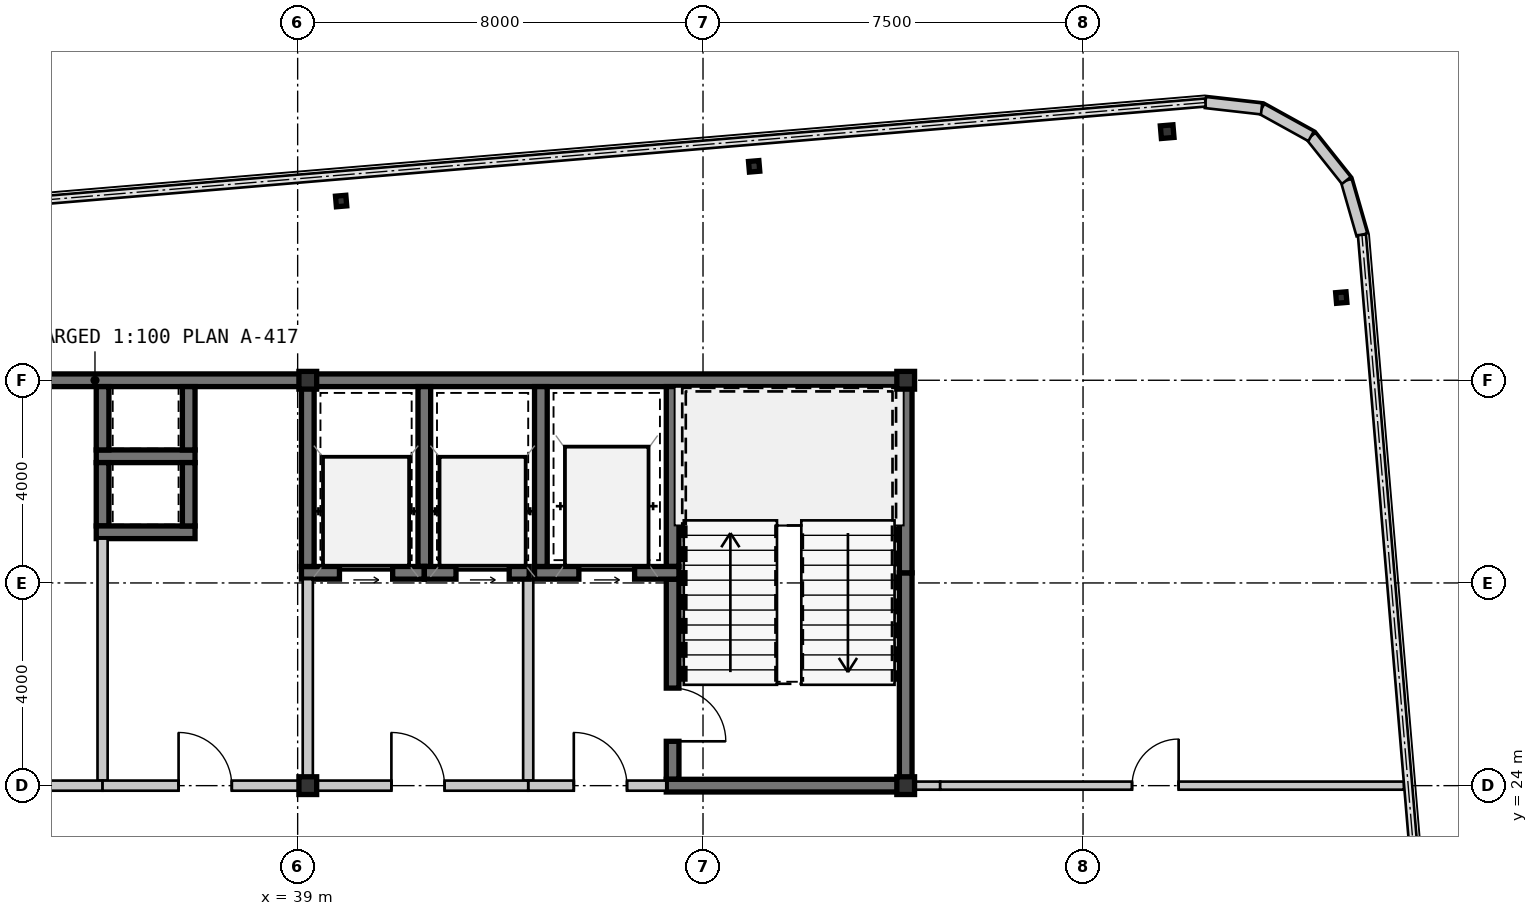
"""IFC4 building model, lengths in metres.
Left out: names, types, materials, properties, quantities, classifications, styles, units other than length and angle.
Written with IfcOpenShell. Run it as: python <this file> out.ifc"""

import sys

from ifc_helpers import new_model, si_unit, direction, frame, frame_2d, origin, origin_2d, place, context, subcontext, project, spatial, rectangle, hollow_rectangle, i_section, extrude, source, transform, mapped, element, fill, save


model = new_model("IFC4")
c1 = context("Model", 3, precision=1e-05, world=origin(), true_north=direction((0.0, 1.0)))
c2 = subcontext(c1, "Body", "Model", "MODEL_VIEW")
j1 = project(units=[si_unit("LENGTHUNIT", "METRE"), si_unit("PLANEANGLEUNIT", "RADIAN")], contexts=[c1])
p1 = place(None, origin())
s1 = spatial("IfcSite", under=j1, at=p1, CompositionType="ELEMENT")
p2 = place(p1, origin())
s2 = spatial("IfcBuilding", under=s1, at=p2, CompositionType="ELEMENT")
p3 = place(p2, frame((0.0, 0.0, 185.15)))
s3 = spatial("IfcBuildingStorey", under=s2, at=p3, CompositionType="ELEMENT", Elevation=185.15)
m1 = source(origin(), c2, "Body", "SweptSolid", [
    extrude(hollow_rectangle(XDim=0.35, YDim=0.35, WallThickness=0.016, at=origin_2d()), origin(), (0.0, 0.0, 1.0), 3.15),
])
for number, where, z_axis, x_axis in (
    (1, (39.2, 24.0, 0.0), (0.0, 0.0, 1.0), (1.0, 0.0, 0.0)),
    (2, (51.0, 24.0, 0.0), (0.0, 0.0, 1.0), (1.0, 0.0, 0.0)),
    (3, (39.2, 32.0, 0.0), (0.0, 0.0, 1.0), (1.0, 0.0, 0.0)),
    (4, (51.0, 32.0, 0.0), (0.0, 0.0, 1.0), (1.0, 0.0, 0.0)),
):
    element("IfcColumn", number, at=place(p3, frame(where, z_axis=z_axis, x_axis=x_axis)), inside=s3, PredefinedType="COLUMN", context=c2, shape_type="MappedRepresentation", body=[
        mapped(m1, transform((0.0, 0.0, 0.0), scale=1.0)),
    ])
m2 = source(origin(), c2, "Body", "SweptSolid", [
    extrude(i_section(OverallWidth=0.205, OverallDepth=0.21, WebThickness=0.009, FlangeThickness=0.014, at=origin_2d()), origin(), (0.0, 0.0, 1.0), 3.15),
])
for number, where, z_axis, x_axis in (
    (5, (39.858, 35.537, 0.0), (0.0, 0.0, 1.0), (0.996, 0.084, 0.0)),
    (6, (48.009, 36.221, 0.0), (0.0, 0.0, 1.0), (0.996, 0.084, 0.0)),
):
    element("IfcColumn", number, at=place(p3, frame(where, z_axis=z_axis, x_axis=x_axis)), inside=s3, PredefinedType="COLUMN", context=c2, shape_type="MappedRepresentation", body=[
        mapped(m2, transform((0.0, 0.0, 0.0), scale=1.0)),
    ])
m3 = source(origin(), c2, "Body", "SweptSolid", [
    extrude(hollow_rectangle(XDim=0.25, YDim=0.25, WallThickness=0.01, at=origin_2d()), origin(), (0.0, 0.0, 1.0), 3.15),
])
p4 = place(p3, frame((56.16, 36.906, 0.0), z_axis=(0.0, 0.0, 1.0), x_axis=(0.99649285925, 0.083677843332, 0.0)))
e7 = element("IfcColumn", 7, at=p4, inside=s3, PredefinedType="COLUMN", context=c2, shape_type="MappedRepresentation", body=[
    mapped(m3, transform((0.0, 0.0, 0.0), scale=1.0)),
])
p5 = place(p3, frame((59.596, 33.632, 0.0), z_axis=(0.0, 0.0, 1.0), x_axis=(0.99649285925, 0.083677843332, 0.0)))
e8 = element("IfcColumn", 8, at=p5, inside=s3, PredefinedType="COLUMN", context=c2, shape_type="MappedRepresentation", body=[
    mapped(m2, transform((0.0, 0.0, 0.0), scale=1.0)),
])
m4 = source(origin(), c2, "Body", "SweptSolid", [
    extrude(rectangle(XDim=1.116, YDim=0.22, at=frame_2d((0.558, 0.0))), origin(), (0.0, 0.0, 1.0), 2.93),
])
for number, where, z_axis, x_axis in (
    (9, (60.004, 34.87, 0.0), (0.0, 0.0, 1.0), (-0.277, 0.961, 0.0)),
    (10, (59.696, 35.943, 0.0), (0.0, 0.0, 1.0), (-0.623, 0.782, 0.0)),
    (11, (59.0, 36.816, 0.0), (0.0, 0.0, 1.0), (-0.875, 0.484, 0.0)),
    (12, (58.024, 37.356, 0.0), (0.0, 0.0, 1.0), (-0.994, 0.112, 0.0)),
):
    element("IfcWall", number, at=place(p3, frame(where, z_axis=z_axis, x_axis=x_axis)), inside=s3, PredefinedType="SOLIDWALL", context=c2, shape_type="MappedRepresentation", body=[
        mapped(m4, transform((0.0, 0.0, 0.0), scale=1.0)),
    ])
m5 = source(origin(), c2, "Body", "SweptSolid", [
    extrude(rectangle(XDim=11.2, YDim=0.25, at=frame_2d((5.6, 0.0))), origin(), (0.0, 0.0, 1.0), 2.93),
])
p6 = place(p3, frame((28.0, 32.0, 0.0), z_axis=(0.0, 0.0, 1.0), x_axis=(1.0, 0.0, 0.0)))
e13 = element("IfcWall", 13, at=p6, inside=s3, PredefinedType="SHEAR", context=c2, shape_type="MappedRepresentation", body=[
    mapped(m5, transform((0.0, 0.0, 0.0), scale=1.0)),
])
m6 = source(origin(), c2, "Body", "SweptSolid", [
    extrude(rectangle(XDim=11.925, YDim=0.25, at=frame_2d((5.962, 0.0))), origin(), (0.0, 0.0, 1.0), 2.93),
])
p7 = place(p3, frame((39.2, 32.0, 0.0), z_axis=(0.0, 0.0, 1.0), x_axis=(1.0, 0.0, 0.0)))
e14 = element("IfcWall", 14, at=p7, inside=s3, PredefinedType="SHEAR", context=c2, shape_type="MappedRepresentation", body=[
    mapped(m6, transform((0.0, 0.0, 0.0), scale=1.0)),
])
m7 = source(origin(), c2, "Body", "SweptSolid", [
    extrude(rectangle(XDim=4.075, YDim=0.25, at=frame_2d((2.038, 0.0))), origin(), (0.0, 0.0, 1.0), 2.93),
])
p8 = place(p3, frame((51.0, 24.125, 0.0), z_axis=(0.0, 0.0, 1.0), x_axis=(0.0, 1.0, 0.0)))
e15 = element("IfcWall", 15, at=p8, inside=s3, PredefinedType="SHEAR", context=c2, shape_type="MappedRepresentation", body=[
    mapped(m7, transform((0.0, 0.0, 0.0), scale=1.0)),
])
m8 = source(origin(), c2, "Body", "SweptSolid", [
    extrude(rectangle(XDim=3.675, YDim=0.25, at=frame_2d((1.837, 0.0))), origin(), (0.0, 0.0, 1.0), 2.93),
])
p9 = place(p3, frame((51.0, 28.2, 0.0), z_axis=(0.0, 0.0, 1.0), x_axis=(0.0, 1.0, 0.0)))
e16 = element("IfcWall", 16, at=p9, inside=s3, PredefinedType="SHEAR", context=c2, shape_type="MappedRepresentation", body=[
    mapped(m8, transform((0.0, 0.0, 0.0), scale=1.0)),
])
m9 = source(origin(), c2, "Body", "SweptSolid", [
    extrude(rectangle(XDim=3.55, YDim=0.25, at=frame_2d((1.775, 0.0))), origin(), (0.0, 0.0, 1.0), 2.93),
])
p10 = place(p3, frame((46.4, 31.875, 0.0), z_axis=(0.0, 0.0, 1.0), x_axis=(0.0, -1.0, 0.0)))
e17 = element("IfcWall", 17, at=p10, inside=s3, PredefinedType="SHEAR", context=c2, shape_type="MappedRepresentation", body=[
    mapped(m9, transform((0.0, 0.0, 0.0), scale=1.0)),
])
m10 = source(origin(), c2, "Body", "SweptSolid", [
    extrude(rectangle(XDim=3.95, YDim=0.25, at=frame_2d((1.975, 0.0))), origin(), (0.0, 0.0, 1.0), 2.93),
])
p11 = place(p3, frame((46.4, 28.075, 0.0), z_axis=(0.0, 0.0, 1.0), x_axis=(0.0, -1.0, 0.0)))
e18 = element("IfcWall", 18, at=p11, inside=s3, PredefinedType="SHEAR", context=c2, shape_type="MappedRepresentation", body=[
    mapped(m10, transform((0.0, 0.0, 0.0), scale=1.0)),
])
m11 = source(origin(), c2, "Body", "SweptSolid", [
    extrude(rectangle(XDim=1.05, YDim=2.1, at=frame_2d((0.525, 1.05))), frame((0.0, 0.135, 0.0), z_axis=(0.0, -1.0, 0.0), x_axis=(1.0, 0.0, 0.0)), (0.0, 0.0, 1.0), 0.27),
])
p12 = place(p11, frame((2.15, 0.0, 0.0)))
e19 = element("IfcOpeningElement", 19, at=p12, cuts=e18, PredefinedType="OPENING", context=c2, shape_type="MappedRepresentation", body=[
    mapped(m11, transform((0.0, 0.0, 0.0), scale=1.0)),
])
m12 = source(origin(), c2, "Body", "SweptSolid", [
    extrude(rectangle(XDim=4.85, YDim=0.25, at=frame_2d((2.425, 0.0))), origin(), (0.0, 0.0, 1.0), 2.93),
])
p13 = place(p3, frame((46.275, 24.0, 0.0), z_axis=(0.0, 0.0, 1.0), x_axis=(1.0, 0.0, 0.0)))
e20 = element("IfcWall", 20, at=p13, inside=s3, PredefinedType="SHEAR", context=c2, shape_type="MappedRepresentation", body=[
    mapped(m12, transform((0.0, 0.0, 0.0), scale=1.0)),
])
m13 = source(origin(), c2, "Body", "SweptSolid", [
    extrude(rectangle(XDim=2.85, YDim=0.25, at=frame_2d((1.425, 0.0))), origin(), (0.0, 0.0, 1.0), 2.93),
])
p14 = place(p3, frame((43.675, 28.2, 0.0), z_axis=(0.0, 0.0, 1.0), x_axis=(1.0, 0.0, 0.0)))
e21 = element("IfcWall", 21, at=p14, inside=s3, PredefinedType="SHEAR", context=c2, shape_type="MappedRepresentation", body=[
    mapped(m13, transform((0.0, 0.0, 0.0), scale=1.0)),
])
m14 = source(origin(), c2, "Body", "SweptSolid", [
    extrude(rectangle(XDim=1.1, YDim=2.15, at=frame_2d((0.55, 1.075))), frame((0.0, 0.135, 0.0), z_axis=(0.0, -1.0, 0.0), x_axis=(1.0, 0.0, 0.0)), (0.0, 0.0, 1.0), 0.27),
])
p15 = place(p14, frame((0.875, 0.0, 0.0)))
e22 = element("IfcOpeningElement", 22, at=p15, cuts=e21, PredefinedType="OPENING", context=c2, shape_type="MappedRepresentation", body=[
    mapped(m14, transform((0.0, 0.0, 0.0), scale=1.0)),
])
p16 = place(p3, frame((43.8, 31.875, 0.0), z_axis=(0.0, 0.0, 1.0), x_axis=(0.0, -1.0, 0.0)))
e23 = element("IfcWall", 23, at=p16, inside=s3, PredefinedType="SHEAR", context=c2, shape_type="MappedRepresentation", body=[
    mapped(m9, transform((0.0, 0.0, 0.0), scale=1.0)),
])
m15 = source(origin(), c2, "Body", "SweptSolid", [
    extrude(rectangle(XDim=3.975, YDim=0.2, at=frame_2d((1.987, 0.0))), origin(), (0.0, 0.0, 1.0), 2.93),
])
p17 = place(p3, frame((43.55, 28.075, 0.0), z_axis=(0.0, 0.0, 1.0), x_axis=(0.0, -1.0, 0.0)))
e24 = element("IfcWall", 24, at=p17, inside=s3, PredefinedType="SOLIDWALL", context=c2, shape_type="MappedRepresentation", body=[
    mapped(m15, transform((0.0, 0.0, 0.0), scale=1.0)),
])
m16 = source(origin(), c2, "Body", "SweptSolid", [
    extrude(rectangle(XDim=2.725, YDim=0.2, at=frame_2d((1.362, 0.0))), origin(), (0.0, 0.0, 1.0), 2.397),
])
p18 = place(p3, frame((43.55, 24.0, 0.0), z_axis=(0.0, 0.0, 1.0), x_axis=(1.0, 0.0, 0.0)))
e25 = element("IfcWall", 25, at=p18, inside=s3, PredefinedType="SOLIDWALL", context=c2, shape_type="MappedRepresentation", body=[
    mapped(m16, transform((0.0, 0.0, 0.0), scale=1.0)),
])
m17 = source(origin(), c2, "Body", "SweptSolid", [
    extrude(rectangle(XDim=1.05, YDim=2.1, at=frame_2d((0.525, 1.05))), frame((0.0, 0.11, 0.0), z_axis=(0.0, -1.0, 0.0), x_axis=(1.0, 0.0, 0.0)), (0.0, 0.0, 1.0), 0.22),
])
p19 = place(p18, frame((0.9, 0.0, 0.0)))
e26 = element("IfcOpeningElement", 26, at=p19, cuts=e25, PredefinedType="OPENING", context=c2, shape_type="MappedRepresentation", body=[
    mapped(m17, transform((0.0, 0.0, 0.0), scale=1.0)),
])
m18 = source(origin(), c2, "Body", "SweptSolid", [
    extrude(rectangle(XDim=1.95, YDim=0.25, at=frame_2d((0.975, 0.0))), origin(), (0.0, 0.0, 1.0), 2.93),
])
p20 = place(p3, frame((35.025, 30.5, 0.0), z_axis=(0.0, 0.0, 1.0), x_axis=(1.0, 0.0, 0.0)))
e27 = element("IfcWall", 27, at=p20, inside=s3, PredefinedType="SHEAR", context=c2, shape_type="MappedRepresentation", body=[
    mapped(m18, transform((0.0, 0.0, 0.0), scale=1.0)),
])
m19 = source(origin(), c2, "Body", "SweptSolid", [
    extrude(rectangle(XDim=1.25, YDim=0.25, at=frame_2d((0.625, 0.0))), origin(), (0.0, 0.0, 1.0), 2.93),
])
for number, where, z_axis, x_axis in (
    (28, (35.15, 31.875, 0.0), (0.0, 0.0, 1.0), (0.0, -1.0, 0.0)),
    (29, (36.85, 30.625, 0.0), (0.0, 0.0, 1.0), (0.0, 1.0, 0.0)),
    (30, (35.15, 30.375, 0.0), (0.0, 0.0, 1.0), (0.0, -1.0, 0.0)),
):
    element("IfcWall", number, at=place(p3, frame(where, z_axis=z_axis, x_axis=x_axis)), inside=s3, PredefinedType="SHEAR", context=c2, shape_type="MappedRepresentation", body=[
        mapped(m19, transform((0.0, 0.0, 0.0), scale=1.0)),
    ])
p21 = place(p3, frame((35.025, 29.0, 0.0), z_axis=(0.0, 0.0, 1.0), x_axis=(1.0, 0.0, 0.0)))
e31 = element("IfcWall", 31, at=p21, inside=s3, PredefinedType="SHEAR", context=c2, shape_type="MappedRepresentation", body=[
    mapped(m18, transform((0.0, 0.0, 0.0), scale=1.0)),
])
p22 = place(p3, frame((36.85, 29.125, 0.0), z_axis=(0.0, 0.0, 1.0), x_axis=(0.0, 1.0, 0.0)))
e32 = element("IfcWall", 32, at=p22, inside=s3, PredefinedType="SHEAR", context=c2, shape_type="MappedRepresentation", body=[
    mapped(m19, transform((0.0, 0.0, 0.0), scale=1.0)),
])
p23 = place(p3, frame((41.5, 28.325, 0.0), z_axis=(0.0, 0.0, 1.0), x_axis=(0.0, 1.0, 0.0)))
e33 = element("IfcWall", 33, at=p23, inside=s3, PredefinedType="SHEAR", context=c2, shape_type="MappedRepresentation", body=[
    mapped(m9, transform((0.0, 0.0, 0.0), scale=1.0)),
])
m20 = source(origin(), c2, "Body", "SweptSolid", [
    extrude(rectangle(XDim=2.425, YDim=0.25, at=frame_2d((1.212, 0.0))), origin(), (0.0, 0.0, 1.0), 2.93),
])
p24 = place(p3, frame((39.075, 28.2, 0.0), z_axis=(0.0, 0.0, 1.0), x_axis=(1.0, 0.0, 0.0)))
e34 = element("IfcWall", 34, at=p24, inside=s3, PredefinedType="SHEAR", context=c2, shape_type="MappedRepresentation", body=[
    mapped(m20, transform((0.0, 0.0, 0.0), scale=1.0)),
])
m21 = source(origin(), c2, "Body", "SweptSolid", [
    extrude(rectangle(XDim=1.05, YDim=2.15, at=frame_2d((0.525, 1.075))), frame((0.0, 0.135, 0.0), z_axis=(0.0, -1.0, 0.0), x_axis=(1.0, 0.0, 0.0)), (0.0, 0.0, 1.0), 0.27),
])
p25 = place(p24, frame((0.75, 0.0, 0.0)))
e35 = element("IfcOpeningElement", 35, at=p25, cuts=e34, PredefinedType="OPENING", context=c2, shape_type="MappedRepresentation", body=[
    mapped(m21, transform((0.0, 0.0, 0.0), scale=1.0)),
])
p26 = place(p3, frame((39.2, 31.875, 0.0), z_axis=(0.0, 0.0, 1.0), x_axis=(0.0, -1.0, 0.0)))
e36 = element("IfcWall", 36, at=p26, inside=s3, PredefinedType="SHEAR", context=c2, shape_type="MappedRepresentation", body=[
    mapped(m9, transform((0.0, 0.0, 0.0), scale=1.0)),
])
m22 = source(origin(), c2, "Body", "SweptSolid", [
    extrude(rectangle(XDim=2.07, YDim=0.25, at=frame_2d((1.035, 0.0))), origin(), (0.0, 0.0, 1.0), 2.93),
])
p27 = place(p3, frame((41.5, 28.2, 0.0), z_axis=(0.0, 0.0, 1.0), x_axis=(1.0, 0.0, 0.0)))
e37 = element("IfcWall", 37, at=p27, inside=s3, PredefinedType="SHEAR", context=c2, shape_type="MappedRepresentation", body=[
    mapped(m22, transform((0.0, 0.0, 0.0), scale=1.0)),
])
p28 = place(p27, frame((0.625, 0.0, 0.0)))
e38 = element("IfcOpeningElement", 38, at=p28, cuts=e37, PredefinedType="OPENING", context=c2, shape_type="MappedRepresentation", body=[
    mapped(m21, transform((0.0, 0.0, 0.0), scale=1.0)),
])
m23 = source(origin(), c2, "Body", "SweptSolid", [
    extrude(rectangle(XDim=3.975, YDim=0.2, at=frame_2d((1.987, 0.0))), origin(), (0.0, 0.0, 1.0), 2.47),
])
p29 = place(p3, frame((39.2, 24.1, 0.0), z_axis=(0.0, 0.0, 1.0), x_axis=(0.0, 1.0, 0.0)))
e39 = element("IfcWall", 39, at=p29, inside=s3, PredefinedType="SOLIDWALL", context=c2, shape_type="MappedRepresentation", body=[
    mapped(m23, transform((0.0, 0.0, 0.0), scale=1.0)),
])
m24 = source(origin(), c2, "Body", "SweptSolid", [
    extrude(rectangle(XDim=4.35, YDim=0.2, at=frame_2d((2.175, 0.0))), origin(), (0.0, 0.0, 1.0), 2.397),
])
p30 = place(p3, frame((43.55, 24.0, 0.0), z_axis=(0.0, 0.0, 1.0), x_axis=(-1.0, 0.0, 0.0)))
e40 = element("IfcWall", 40, at=p30, inside=s3, PredefinedType="SOLIDWALL", context=c2, shape_type="MappedRepresentation", body=[
    mapped(m24, transform((0.0, 0.0, 0.0), scale=1.0)),
])
p31 = place(p30, frame((1.65, 0.0, 0.0)))
e41 = element("IfcOpeningElement", 41, at=p31, cuts=e40, PredefinedType="OPENING", context=c2, shape_type="MappedRepresentation", body=[
    mapped(m17, transform((0.0, 0.0, 0.0), scale=1.0)),
])
m25 = source(origin(), c2, "Body", "SweptSolid", [
    extrude(rectangle(XDim=4.775, YDim=0.2, at=frame_2d((2.387, 0.0))), origin(), (0.0, 0.0, 1.0), 2.93),
])
p32 = place(p3, frame((35.15, 28.875, 0.0), z_axis=(0.0, 0.0, 1.0), x_axis=(0.0, -1.0, 0.0)))
e42 = element("IfcWall", 42, at=p32, inside=s3, PredefinedType="SOLIDWALL", context=c2, shape_type="MappedRepresentation", body=[
    mapped(m25, transform((0.0, 0.0, 0.0), scale=1.0)),
])
m26 = source(origin(), c2, "Body", "SweptSolid", [
    extrude(rectangle(XDim=8.7, YDim=0.2, at=frame_2d((4.35, 0.0))), origin(), (0.0, 0.0, 1.0), 2.47),
])
p33 = place(p3, frame((35.15, 24.0, 0.0), z_axis=(0.0, 0.0, 1.0), x_axis=(-1.0, 0.0, 0.0)))
e43 = element("IfcWall", 43, at=p33, inside=s3, PredefinedType="SOLIDWALL", context=c2, shape_type="MappedRepresentation", body=[
    mapped(m26, transform((0.0, 0.0, 0.0), scale=1.0)),
])
p34 = place(p33, frame((3.825, 0.0, 0.0)))
e44 = element("IfcOpeningElement", 44, at=p34, cuts=e43, PredefinedType="OPENING", context=c2, shape_type="MappedRepresentation", body=[
    mapped(m17, transform((0.0, 0.0, 0.0), scale=1.0)),
])
m27 = source(origin(), c2, "Body", "SweptSolid", [
    extrude(rectangle(XDim=4.05, YDim=0.2, at=frame_2d((2.025, 0.0))), origin(), (0.0, 0.0, 1.0), 2.47),
])
p35 = place(p3, frame((39.2, 24.0, 0.0), z_axis=(0.0, 0.0, 1.0), x_axis=(-1.0, 0.0, 0.0)))
e45 = element("IfcWall", 45, at=p35, inside=s3, PredefinedType="SOLIDWALL", context=c2, shape_type="MappedRepresentation", body=[
    mapped(m27, transform((0.0, 0.0, 0.0), scale=1.0)),
])
p36 = place(p35, frame((1.5, 0.0, 0.0)))
e46 = element("IfcOpeningElement", 46, at=p36, cuts=e45, PredefinedType="OPENING", context=c2, shape_type="MappedRepresentation", body=[
    mapped(m17, transform((0.0, 0.0, 0.0), scale=1.0)),
])
m28 = source(origin(), c2, "Body", "SweptSolid", [
    extrude(rectangle(XDim=0.556, YDim=0.16, at=frame_2d((0.278, 0.0))), origin(), (0.0, 0.0, 1.0), 2.47),
])
p37 = place(p3, frame((51.125, 24.0, 0.0), z_axis=(0.0, 0.0, 1.0), x_axis=(1.0, 0.0, 0.0)))
e47 = element("IfcWall", 47, at=p37, inside=s3, PredefinedType="PARTITIONING", context=c2, shape_type="MappedRepresentation", body=[
    mapped(m28, transform((0.0, 0.0, 0.0), scale=1.0)),
])
m29 = source(origin(), c2, "Body", "SweptSolid", [
    extrude(rectangle(XDim=9.153, YDim=0.16, at=frame_2d((4.576, 0.0))), origin(), (0.0, 0.0, 1.0), 2.93),
])
p38 = place(p3, frame((51.681, 24.0, 0.0), z_axis=(0.0, 0.0, 1.0), x_axis=(1.0, 0.0, 0.0)))
e48 = element("IfcWall", 48, at=p38, inside=s3, PredefinedType="PARTITIONING", context=c2, shape_type="MappedRepresentation", body=[
    mapped(m29, transform((0.0, 0.0, 0.0), scale=1.0)),
])
m30 = source(origin(), c2, "Body", "SweptSolid", [
    extrude(rectangle(XDim=0.92, YDim=2.1, at=frame_2d((0.46, 1.05))), frame((0.0, 0.09, 0.0), z_axis=(0.0, -1.0, 0.0), x_axis=(1.0, 0.0, 0.0)), (0.0, 0.0, 1.0), 0.18),
])
p39 = place(p38, frame((3.786, 0.0, 0.0)))
e49 = element("IfcOpeningElement", 49, at=p39, cuts=e48, PredefinedType="OPENING", context=c2, shape_type="MappedRepresentation", body=[
    mapped(m30, transform((0.0, 0.0, 0.0), scale=1.0)),
])
m31 = source(origin(), c2, "Body", "SweptSolid", [
    extrude(rectangle(XDim=1.05, YDim=2.1, at=frame_2d((0.525, 1.05))), frame((0.0, 0.025, 0.0), z_axis=(0.0, -1.0, 0.0), x_axis=(1.0, 0.0, 0.0)), (0.0, 0.0, 1.0), 0.05),
])
p40 = place(p12, origin())
e50 = element("IfcDoor", 50, at=p40, inside=s3, OperationType="SINGLE_SWING_RIGHT", PredefinedType="DOOR", context=c2, shape_type="MappedRepresentation", body=[
    mapped(m31, transform((0.0, 0.0, 0.0), scale=1.0)),
])
fill(e19, e50)
m32 = source(origin(), c2, "Body", "SweptSolid", [
    extrude(rectangle(XDim=1.1, YDim=2.15, at=frame_2d((0.55, 1.075))), frame((0.0, 0.025, 0.0), z_axis=(0.0, -1.0, 0.0), x_axis=(1.0, 0.0, 0.0)), (0.0, 0.0, 1.0), 0.05),
])
p41 = place(p15, origin())
e51 = element("IfcDoor", 51, at=p41, inside=s3, OperationType="SLIDING_TO_LEFT", PredefinedType="DOOR", context=c2, shape_type="MappedRepresentation", body=[
    mapped(m32, transform((0.0, 0.0, 0.0), scale=1.0)),
])
fill(e22, e51)
p42 = place(p19, origin())
e52 = element("IfcDoor", 52, at=p42, inside=s3, OperationType="SINGLE_SWING_LEFT", PredefinedType="DOOR", context=c2, shape_type="MappedRepresentation", body=[
    mapped(m31, transform((0.0, 0.0, 0.0), scale=1.0)),
])
fill(e26, e52)
m33 = source(origin(), c2, "Body", "SweptSolid", [
    extrude(rectangle(XDim=1.05, YDim=2.15, at=frame_2d((0.525, 1.075))), frame((0.0, 0.025, 0.0), z_axis=(0.0, -1.0, 0.0), x_axis=(1.0, 0.0, 0.0)), (0.0, 0.0, 1.0), 0.05),
])
p43 = place(p25, origin())
e53 = element("IfcDoor", 53, at=p43, inside=s3, OperationType="SLIDING_TO_LEFT", PredefinedType="DOOR", context=c2, shape_type="MappedRepresentation", body=[
    mapped(m33, transform((0.0, 0.0, 0.0), scale=1.0)),
])
fill(e35, e53)
p44 = place(p28, origin())
e54 = element("IfcDoor", 54, at=p44, inside=s3, OperationType="SLIDING_TO_LEFT", PredefinedType="DOOR", context=c2, shape_type="MappedRepresentation", body=[
    mapped(m33, transform((0.0, 0.0, 0.0), scale=1.0)),
])
fill(e38, e54)
p45 = place(p31, frame((1.05, 0.0, 0.0), z_axis=(0.0, 0.0, 1.0), x_axis=(-1.0, 0.0, 0.0)))
e55 = element("IfcDoor", 55, at=p45, inside=s3, OperationType="SINGLE_SWING_LEFT", PredefinedType="DOOR", context=c2, shape_type="MappedRepresentation", body=[
    mapped(m31, transform((0.0, 0.0, 0.0), scale=1.0)),
])
fill(e41, e55)
p46 = place(p36, frame((1.05, 0.0, 0.0), z_axis=(0.0, 0.0, 1.0), x_axis=(-1.0, 0.0, 0.0)))
e56 = element("IfcDoor", 56, at=p46, inside=s3, OperationType="SINGLE_SWING_LEFT", PredefinedType="DOOR", context=c2, shape_type="MappedRepresentation", body=[
    mapped(m31, transform((0.0, 0.0, 0.0), scale=1.0)),
])
fill(e46, e56)
m34 = source(origin(), c2, "Body", "SweptSolid", [
    extrude(rectangle(XDim=0.92, YDim=2.1, at=frame_2d((0.46, 1.05))), frame((0.0, 0.025, 0.0), z_axis=(0.0, -1.0, 0.0), x_axis=(1.0, 0.0, 0.0)), (0.0, 0.0, 1.0), 0.05),
])
p47 = place(p39, origin())
e57 = element("IfcDoor", 57, at=p47, inside=s3, OperationType="SINGLE_SWING_RIGHT", PredefinedType="DOOR", context=c2, shape_type="MappedRepresentation", body=[
    mapped(m34, transform((0.0, 0.0, 0.0), scale=1.0)),
])
fill(e49, e57)
save(model, sys.argv[1])
